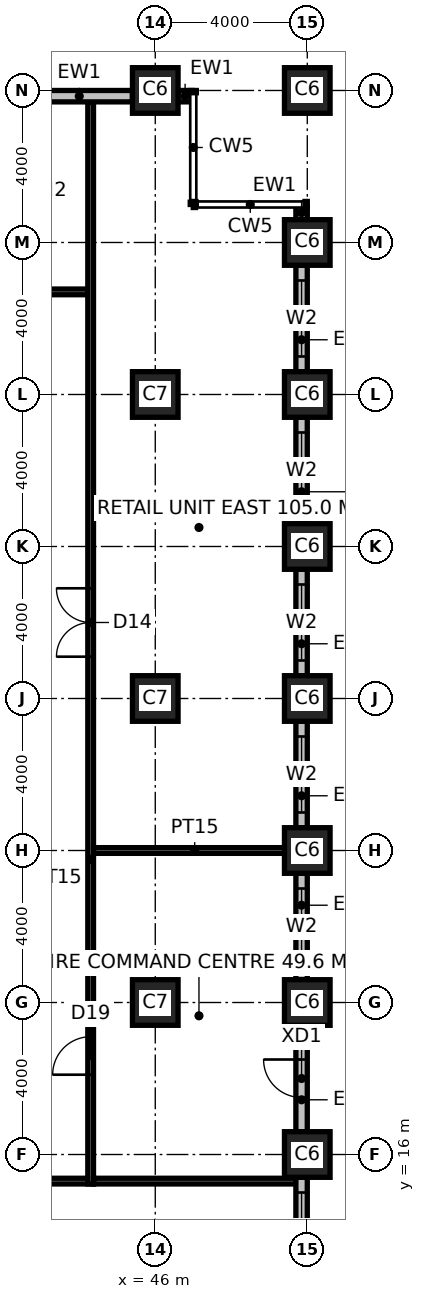
"""IFC4 building model, lengths in metres.
Left out: names, types, materials, properties, quantities, classifications, styles, units other than length and angle.
Written with IfcOpenShell. Run it as: python <this file> out.ifc"""

import sys

from ifc_helpers import new_model, si_unit, direction, frame, frame_2d, origin, origin_2d, place, context, subcontext, project, spatial, rectangle, hollow_rectangle, extrude, element, fill, save


model = new_model("IFC4")
c1 = context("Model", 3, precision=1e-05, world=origin(), true_north=direction((0.0, 1.0)))
c2 = subcontext(c1, "Body", "Model", "MODEL_VIEW")
j1 = project(units=[si_unit("LENGTHUNIT", "METRE"), si_unit("PLANEANGLEUNIT", "RADIAN")], contexts=[c1])
p1 = place(None, origin())
s1 = spatial("IfcSite", under=j1, at=p1, CompositionType="ELEMENT")
p2 = place(p1, origin())
s2 = spatial("IfcBuilding", under=s1, at=p2, CompositionType="ELEMENT")
p3 = place(p2, origin())
s3 = spatial("IfcBuildingStorey", under=s2, at=p3, CompositionType="ELEMENT", Elevation=0.0)
for number, where, z_axis, x_axis in (
    (1, (46.0, 44.0, -0.3), (0.0, 0.0, 1.0), (1.0, 0.0, 0.0)),
    (2, (50.0, 16.0, -0.3), (0.0, 0.0, 1.0), (1.0, 0.0, 0.0)),
    (3, (50.0, 20.0, -0.3), (0.0, 0.0, 1.0), (1.0, 0.0, 0.0)),
    (4, (50.0, 24.0, -0.3), (0.0, 0.0, 1.0), (1.0, 0.0, 0.0)),
    (5, (50.0, 28.0, -0.3), (0.0, 0.0, 1.0), (1.0, 0.0, 0.0)),
    (6, (50.0, 32.0, -0.3), (0.0, 0.0, 1.0), (1.0, 0.0, 0.0)),
    (7, (50.0, 36.0, -0.3), (0.0, 0.0, 1.0), (1.0, 0.0, 0.0)),
    (8, (50.0, 40.0, -0.3), (0.0, 0.0, 1.0), (1.0, 0.0, 0.0)),
    (9, (50.0, 44.0, -0.3), (0.0, 0.0, 1.0), (1.0, 0.0, 0.0)),
):
    element("IfcColumn", number, at=place(p3, frame(where, z_axis=z_axis, x_axis=x_axis)), inside=s3, PredefinedType="COLUMN", context=c2, shape_type="SweptSolid", body=[
        extrude(hollow_rectangle(XDim=1.2, YDim=1.2, WallThickness=0.125, at=origin_2d()), origin(), (0.0, 0.0, 1.0), 6.3),
    ])
for number, where, z_axis, x_axis in (
    (10, (46.0, 20.0, -0.3), (0.0, 0.0, 1.0), (1.0, 0.0, 0.0)),
    (11, (46.0, 28.0, -0.3), (0.0, 0.0, 1.0), (1.0, 0.0, 0.0)),
    (12, (46.0, 36.0, -0.3), (0.0, 0.0, 1.0), (1.0, 0.0, 0.0)),
):
    element("IfcColumn", number, at=place(p3, frame(where, z_axis=z_axis, x_axis=x_axis)), inside=s3, PredefinedType="COLUMN", context=c2, shape_type="SweptSolid", body=[
        extrude(hollow_rectangle(XDim=1.2, YDim=1.2, WallThickness=0.1, at=origin_2d()), origin(), (0.0, 0.0, 1.0), 6.3),
    ])
p4 = place(p3, frame((29.625, 15.3, 0.0), z_axis=(0.0, 0.0, 1.0), x_axis=(1.0, 0.0, 0.0)))
e13 = element("IfcWall", 13, at=p4, inside=s3, PredefinedType="PARTITIONING", context=c2, shape_type="SweptSolid", body=[
    extrude(rectangle(XDim=14.75, YDim=0.15, at=frame_2d((7.375, 0.0))), origin(), (0.0, 0.0, 1.0), 5.85),
])
p5 = place(p3, frame((36.35, 38.7, 0.0), z_axis=(0.0, 0.0, 1.0), x_axis=(1.0, 0.0, 0.0)))
e14 = element("IfcWall", 14, at=p5, inside=s3, PredefinedType="PARTITIONING", context=c2, shape_type="SweptSolid", body=[
    extrude(rectangle(XDim=7.875, YDim=0.15, at=frame_2d((3.938, 0.0))), origin(), (0.0, 0.0, 1.0), 5.85),
])
p6 = place(p5, frame((2.15, 0.0, 0.0)))
e15 = element("IfcOpeningElement", 15, at=p6, cuts=e14, PredefinedType="OPENING", context=c2, shape_type="SweptSolid", body=[
    extrude(rectangle(XDim=1.0, YDim=2.2, at=frame_2d((0.5, 1.1))), frame((0.0, 0.085, 0.0), z_axis=(0.0, -1.0, 0.0), x_axis=(1.0, 0.0, 0.0)), (0.0, 0.0, 1.0), 0.17),
])
p7 = place(p3, frame((44.3, 15.225, 0.0), z_axis=(0.0, 0.0, 1.0), x_axis=(0.0, 1.0, 0.0)))
e16 = element("IfcWall", 16, at=p7, inside=s3, PredefinedType="PARTITIONING", context=c2, shape_type="SweptSolid", body=[
    extrude(rectangle(XDim=28.475, YDim=0.15, at=frame_2d((14.237, 0.0))), origin(), (0.0, 0.0, 1.0), 5.85),
])
p8 = place(p7, frame((2.875, 0.0, 0.0)))
e17 = element("IfcOpeningElement", 17, at=p8, cuts=e16, PredefinedType="OPENING", context=c2, shape_type="SweptSolid", body=[
    extrude(rectangle(XDim=1.0, YDim=2.2, at=frame_2d((0.5, 1.1))), frame((0.0, 0.085, 0.0), z_axis=(0.0, -1.0, 0.0), x_axis=(1.0, 0.0, 0.0)), (0.0, 0.0, 1.0), 0.17),
])
p9 = place(p7, frame((13.875, 0.0, 0.0)))
e18 = element("IfcOpeningElement", 18, at=p9, cuts=e16, PredefinedType="OPENING", context=c2, shape_type="SweptSolid", body=[
    extrude(rectangle(XDim=1.8, YDim=2.7, at=frame_2d((0.9, 1.35))), frame((0.0, 0.085, 0.0), z_axis=(0.0, -1.0, 0.0), x_axis=(1.0, 0.0, 0.0)), (0.0, 0.0, 1.0), 0.17),
])
p10 = place(p3, frame((44.375, 15.3, 0.0), z_axis=(0.0, 0.0, 1.0), x_axis=(1.0, 0.0, 0.0)))
e19 = element("IfcWall", 19, at=p10, inside=s3, PredefinedType="PARTITIONING", context=c2, shape_type="SweptSolid", body=[
    extrude(rectangle(XDim=5.325, YDim=0.15, at=frame_2d((2.663, 0.0))), origin(), (0.0, 0.0, 1.0), 5.85),
])
p11 = place(p3, frame((44.375, 24.0, 0.0), z_axis=(0.0, 0.0, 1.0), x_axis=(1.0, 0.0, 0.0)))
e20 = element("IfcWall", 20, at=p11, inside=s3, PredefinedType="PARTITIONING", context=c2, shape_type="SweptSolid", body=[
    extrude(rectangle(XDim=5.325, YDim=0.15, at=frame_2d((2.663, 0.0))), origin(), (0.0, 0.0, 1.0), 4.95),
])
p12 = place(p3, frame((49.85, 12.6, 0.0), z_axis=(0.0, 0.0, 1.0), x_axis=(0.0, 1.0, 0.0)))
e21 = element("IfcWall", 21, at=p12, inside=s3, PredefinedType="ELEMENTEDWALL", context=c2, shape_type="SweptSolid", body=[
    extrude(rectangle(XDim=2.8, YDim=0.3, at=frame_2d((1.4, 0.0))), origin(), (0.0, 0.0, 1.0), 4.95),
])
p13 = place(p12, frame((0.4, 0.0, 1.2)))
e22 = element("IfcOpeningElement", 22, at=p13, cuts=e21, PredefinedType="OPENING", context=c2, shape_type="SweptSolid", body=[
    extrude(rectangle(XDim=2.0, YDim=3.6, at=frame_2d((1.0, 1.8))), frame((0.0, 0.16, 0.0), z_axis=(0.0, -1.0, 0.0), x_axis=(1.0, 0.0, 0.0)), (0.0, 0.0, 1.0), 0.32),
])
p14 = place(p3, frame((49.85, 16.6, 0.0), z_axis=(0.0, 0.0, 1.0), x_axis=(0.0, 1.0, 0.0)))
e23 = element("IfcWall", 23, at=p14, inside=s3, PredefinedType="ELEMENTEDWALL", context=c2, shape_type="SweptSolid", body=[
    extrude(rectangle(XDim=2.8, YDim=0.3, at=frame_2d((1.4, 0.0))), origin(), (0.0, 0.0, 1.0), 4.95),
])
p15 = place(p14, frame((0.9, 0.0, 0.0)))
e24 = element("IfcOpeningElement", 24, at=p15, cuts=e23, PredefinedType="OPENING", context=c2, shape_type="SweptSolid", body=[
    extrude(rectangle(XDim=1.0, YDim=2.4, at=frame_2d((0.5, 1.2))), frame((0.0, 0.16, 0.0), z_axis=(0.0, -1.0, 0.0), x_axis=(1.0, 0.0, 0.0)), (0.0, 0.0, 1.0), 0.32),
])
p16 = place(p3, frame((49.85, 20.6, 0.0), z_axis=(0.0, 0.0, 1.0), x_axis=(0.0, 1.0, 0.0)))
e25 = element("IfcWall", 25, at=p16, inside=s3, PredefinedType="ELEMENTEDWALL", context=c2, shape_type="SweptSolid", body=[
    extrude(rectangle(XDim=2.8, YDim=0.3, at=frame_2d((1.4, 0.0))), origin(), (0.0, 0.0, 1.0), 4.95),
])
p17 = place(p16, frame((0.4, 0.0, 1.2)))
e26 = element("IfcOpeningElement", 26, at=p17, cuts=e25, PredefinedType="OPENING", context=c2, shape_type="SweptSolid", body=[
    extrude(rectangle(XDim=2.0, YDim=3.6, at=frame_2d((1.0, 1.8))), frame((0.0, 0.16, 0.0), z_axis=(0.0, -1.0, 0.0), x_axis=(1.0, 0.0, 0.0)), (0.0, 0.0, 1.0), 0.32),
])
p18 = place(p3, frame((49.85, 24.6, 0.0), z_axis=(0.0, 0.0, 1.0), x_axis=(0.0, 1.0, 0.0)))
e27 = element("IfcWall", 27, at=p18, inside=s3, PredefinedType="ELEMENTEDWALL", context=c2, shape_type="SweptSolid", body=[
    extrude(rectangle(XDim=2.8, YDim=0.3, at=frame_2d((1.4, 0.0))), origin(), (0.0, 0.0, 1.0), 4.95),
])
p19 = place(p18, frame((0.4, 0.0, 1.2)))
e28 = element("IfcOpeningElement", 28, at=p19, cuts=e27, PredefinedType="OPENING", context=c2, shape_type="SweptSolid", body=[
    extrude(rectangle(XDim=2.0, YDim=3.6, at=frame_2d((1.0, 1.8))), frame((0.0, 0.16, 0.0), z_axis=(0.0, -1.0, 0.0), x_axis=(1.0, 0.0, 0.0)), (0.0, 0.0, 1.0), 0.32),
])
p20 = place(p3, frame((49.85, 28.6, 0.0), z_axis=(0.0, 0.0, 1.0), x_axis=(0.0, 1.0, 0.0)))
e29 = element("IfcWall", 29, at=p20, inside=s3, PredefinedType="ELEMENTEDWALL", context=c2, shape_type="SweptSolid", body=[
    extrude(rectangle(XDim=2.8, YDim=0.3, at=frame_2d((1.4, 0.0))), origin(), (0.0, 0.0, 1.0), 4.95),
])
p21 = place(p20, frame((0.4, 0.0, 1.2)))
e30 = element("IfcOpeningElement", 30, at=p21, cuts=e29, PredefinedType="OPENING", context=c2, shape_type="SweptSolid", body=[
    extrude(rectangle(XDim=2.0, YDim=3.6, at=frame_2d((1.0, 1.8))), frame((0.0, 0.16, 0.0), z_axis=(0.0, -1.0, 0.0), x_axis=(1.0, 0.0, 0.0)), (0.0, 0.0, 1.0), 0.32),
])
p22 = place(p3, frame((49.85, 32.6, 0.0), z_axis=(0.0, 0.0, 1.0), x_axis=(0.0, 1.0, 0.0)))
e31 = element("IfcWall", 31, at=p22, inside=s3, PredefinedType="ELEMENTEDWALL", context=c2, shape_type="SweptSolid", body=[
    extrude(rectangle(XDim=2.8, YDim=0.3, at=frame_2d((1.4, 0.0))), origin(), (0.0, 0.0, 1.0), 4.95),
])
p23 = place(p22, frame((0.4, 0.0, 1.2)))
e32 = element("IfcOpeningElement", 32, at=p23, cuts=e31, PredefinedType="OPENING", context=c2, shape_type="SweptSolid", body=[
    extrude(rectangle(XDim=2.0, YDim=3.6, at=frame_2d((1.0, 1.8))), frame((0.0, 0.16, 0.0), z_axis=(0.0, -1.0, 0.0), x_axis=(1.0, 0.0, 0.0)), (0.0, 0.0, 1.0), 0.32),
])
p24 = place(p3, frame((49.85, 36.6, 0.0), z_axis=(0.0, 0.0, 1.0), x_axis=(0.0, 1.0, 0.0)))
e33 = element("IfcWall", 33, at=p24, inside=s3, PredefinedType="ELEMENTEDWALL", context=c2, shape_type="SweptSolid", body=[
    extrude(rectangle(XDim=2.8, YDim=0.3, at=frame_2d((1.4, 0.0))), origin(), (0.0, 0.0, 1.0), 4.95),
])
p25 = place(p24, frame((0.4, 0.0, 1.2)))
e34 = element("IfcOpeningElement", 34, at=p25, cuts=e33, PredefinedType="OPENING", context=c2, shape_type="SweptSolid", body=[
    extrude(rectangle(XDim=2.0, YDim=3.6, at=frame_2d((1.0, 1.8))), frame((0.0, 0.16, 0.0), z_axis=(0.0, -1.0, 0.0), x_axis=(1.0, 0.0, 0.0)), (0.0, 0.0, 1.0), 0.32),
])
p26 = place(p3, frame((49.85, 40.6, 0.0), z_axis=(0.0, 0.0, 1.0), x_axis=(0.0, 1.0, 0.0)))
e35 = element("IfcWall", 35, at=p26, inside=s3, PredefinedType="ELEMENTEDWALL", context=c2, shape_type="SweptSolid", body=[
    extrude(rectangle(XDim=0.37, YDim=0.3, at=frame_2d((0.185, 0.0))), origin(), (0.0, 0.0, 1.0), 4.95),
])
p27 = place(p3, frame((45.4, 43.85, 0.0), z_axis=(0.0, 0.0, 1.0), x_axis=(-1.0, 0.0, 0.0)))
e36 = element("IfcWall", 36, at=p27, inside=s3, PredefinedType="ELEMENTEDWALL", context=c2, shape_type="SweptSolid", body=[
    extrude(rectangle(XDim=2.8, YDim=0.3, at=frame_2d((1.4, 0.0))), origin(), (0.0, 0.0, 1.0), 4.95),
])
p28 = place(p3, frame((46.97, 43.85, 0.0), z_axis=(0.0, 0.0, 1.0), x_axis=(-1.0, 0.0, 0.0)))
e37 = element("IfcWall", 37, at=p28, inside=s3, PredefinedType="ELEMENTEDWALL", context=c2, shape_type="SweptSolid", body=[
    extrude(rectangle(XDim=0.37, YDim=0.3, at=frame_2d((0.185, 0.0))), origin(), (0.0, 0.0, 1.0), 4.95),
])
p29 = place(p8, origin())
e38 = element("IfcDoor", 38, at=p29, inside=s3, OperationType="SINGLE_SWING_LEFT", PredefinedType="DOOR", context=c2, shape_type="SweptSolid", body=[
    extrude(rectangle(XDim=1.0, YDim=2.2, at=frame_2d((0.5, 1.1))), frame((0.0, 0.025, 0.0), z_axis=(0.0, -1.0, 0.0), x_axis=(1.0, 0.0, 0.0)), (0.0, 0.0, 1.0), 0.05),
])
fill(e17, e38)
p30 = place(p9, origin())
e39 = element("IfcDoor", 39, at=p30, inside=s3, OperationType="DOUBLE_DOOR_DOUBLE_SWING", PredefinedType="DOOR", context=c2, shape_type="SweptSolid", body=[
    extrude(rectangle(XDim=1.8, YDim=2.7, at=frame_2d((0.9, 1.35))), frame((0.0, 0.025, 0.0), z_axis=(0.0, -1.0, 0.0), x_axis=(1.0, 0.0, 0.0)), (0.0, 0.0, 1.0), 0.05),
])
fill(e18, e39)
p31 = place(p13, origin())
e40 = element("IfcWindow", 40, at=p31, inside=s3, PartitioningType="SINGLE_PANEL", PredefinedType="WINDOW", context=c2, shape_type="SweptSolid", body=[
    extrude(rectangle(XDim=2.0, YDim=3.6, at=frame_2d((1.0, 1.8))), frame((0.0, 0.03, 0.0), z_axis=(0.0, -1.0, 0.0), x_axis=(1.0, 0.0, 0.0)), (0.0, 0.0, 1.0), 0.06),
])
fill(e22, e40)
p32 = place(p15, origin())
e41 = element("IfcDoor", 41, at=p32, inside=s3, OperationType="SINGLE_SWING_RIGHT", PredefinedType="DOOR", context=c2, shape_type="SweptSolid", body=[
    extrude(rectangle(XDim=1.0, YDim=2.4, at=frame_2d((0.5, 1.2))), frame((0.0, 0.025, 0.0), z_axis=(0.0, -1.0, 0.0), x_axis=(1.0, 0.0, 0.0)), (0.0, 0.0, 1.0), 0.05),
])
fill(e24, e41)
p33 = place(p17, origin())
e42 = element("IfcWindow", 42, at=p33, inside=s3, PartitioningType="SINGLE_PANEL", PredefinedType="WINDOW", context=c2, shape_type="SweptSolid", body=[
    extrude(rectangle(XDim=2.0, YDim=3.6, at=frame_2d((1.0, 1.8))), frame((0.0, 0.03, 0.0), z_axis=(0.0, -1.0, 0.0), x_axis=(1.0, 0.0, 0.0)), (0.0, 0.0, 1.0), 0.06),
])
fill(e26, e42)
p34 = place(p19, origin())
e43 = element("IfcWindow", 43, at=p34, inside=s3, PartitioningType="SINGLE_PANEL", PredefinedType="WINDOW", context=c2, shape_type="SweptSolid", body=[
    extrude(rectangle(XDim=2.0, YDim=3.6, at=frame_2d((1.0, 1.8))), frame((0.0, 0.03, 0.0), z_axis=(0.0, -1.0, 0.0), x_axis=(1.0, 0.0, 0.0)), (0.0, 0.0, 1.0), 0.06),
])
fill(e28, e43)
p35 = place(p21, origin())
e44 = element("IfcWindow", 44, at=p35, inside=s3, PartitioningType="SINGLE_PANEL", PredefinedType="WINDOW", context=c2, shape_type="SweptSolid", body=[
    extrude(rectangle(XDim=2.0, YDim=3.6, at=frame_2d((1.0, 1.8))), frame((0.0, 0.03, 0.0), z_axis=(0.0, -1.0, 0.0), x_axis=(1.0, 0.0, 0.0)), (0.0, 0.0, 1.0), 0.06),
])
fill(e30, e44)
p36 = place(p23, origin())
e45 = element("IfcWindow", 45, at=p36, inside=s3, PartitioningType="SINGLE_PANEL", PredefinedType="WINDOW", context=c2, shape_type="SweptSolid", body=[
    extrude(rectangle(XDim=2.0, YDim=3.6, at=frame_2d((1.0, 1.8))), frame((0.0, 0.03, 0.0), z_axis=(0.0, -1.0, 0.0), x_axis=(1.0, 0.0, 0.0)), (0.0, 0.0, 1.0), 0.06),
])
fill(e32, e45)
p37 = place(p25, origin())
e46 = element("IfcWindow", 46, at=p37, inside=s3, PartitioningType="SINGLE_PANEL", PredefinedType="WINDOW", context=c2, shape_type="SweptSolid", body=[
    extrude(rectangle(XDim=2.0, YDim=3.6, at=frame_2d((1.0, 1.8))), frame((0.0, 0.03, 0.0), z_axis=(0.0, -1.0, 0.0), x_axis=(1.0, 0.0, 0.0)), (0.0, 0.0, 1.0), 0.06),
])
fill(e34, e46)
save(model, sys.argv[1])
